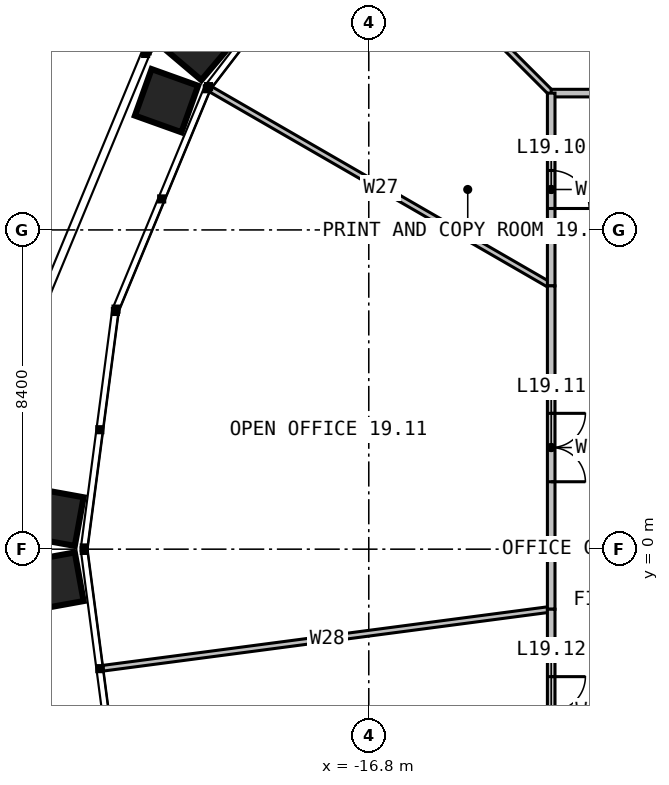
"""IFC4 building model, lengths in metres.
Left out: names, types, materials, properties, quantities, classifications, styles, units other than length and angle.
Written with IfcOpenShell. Run it as: python <this file> out.ifc"""

import sys

from ifc_helpers import new_model, si_unit, direction, frame, frame_2d, origin, place, context, subcontext, project, spatial, rectangle, extrude, element, fill, save


model = new_model("IFC4")
c1 = context("Model", 3, precision=1e-05, world=origin(), true_north=direction((0.0, 1.0)))
c2 = subcontext(c1, "Body", "Model", "MODEL_VIEW")
j1 = project(units=[si_unit("LENGTHUNIT", "METRE"), si_unit("PLANEANGLEUNIT", "RADIAN")], contexts=[c1])
p1 = place(None, origin())
s1 = spatial("IfcSite", under=j1, at=p1, CompositionType="ELEMENT")
p2 = place(p1, origin())
s2 = spatial("IfcBuilding", under=s1, at=p2, CompositionType="ELEMENT")
p3 = place(p2, frame((0.0, 0.0, 81.0)))
s3 = spatial("IfcBuildingStorey", under=s2, at=p3, CompositionType="ELEMENT", Elevation=81.0)
p4 = place(p3, frame((-6.928, 12.0, 0.0), z_axis=(0.0, 0.0, 1.0), x_axis=(-0.500003068493, 0.866023632182, 0.0)))
e1 = element("IfcWall", 1, at=p4, inside=s3, PredefinedType="PARTITIONING", context=c2, shape_type="SweptSolid", body=[
    extrude(rectangle(XDim=10.343, YDim=0.15, at=frame_2d((5.171, 0.0))), origin(), (0.0, 0.0, 1.0), 2.79),
])
p5 = place(p3, frame((-12.0, 12.0, 0.0), z_axis=(0.0, 0.0, 1.0), x_axis=(-0.707106781187, 0.707106781187, 0.0)))
e2 = element("IfcWall", 2, at=p5, inside=s3, PredefinedType="PARTITIONING", context=c2, shape_type="SweptSolid", body=[
    extrude(rectangle(XDim=7.229, YDim=0.15, at=frame_2d((3.614, 0.0))), origin(), (0.0, 0.0, 1.0), 2.79),
])
p6 = place(p3, frame((-12.0, 6.928, 0.0), z_axis=(0.0, 0.0, 1.0), x_axis=(-0.866023632182, 0.500003068493, 0.0)))
e3 = element("IfcWall", 3, at=p6, inside=s3, PredefinedType="PARTITIONING", context=c2, shape_type="SweptSolid", body=[
    extrude(rectangle(XDim=10.343, YDim=0.15, at=frame_2d((5.171, 0.0))), origin(), (0.0, 0.0, 1.0), 2.79),
])
p7 = place(p3, frame((-12.0, -1.58, 0.0), z_axis=(0.0, 0.0, 1.0), x_axis=(-0.991444996724, -0.130525164133, 0.0)))
e4 = element("IfcWall", 4, at=p7, inside=s3, PredefinedType="PARTITIONING", context=c2, shape_type="SweptSolid", body=[
    extrude(rectangle(XDim=11.889, YDim=0.15, at=frame_2d((5.944, 0.0))), origin(), (0.0, 0.0, 1.0), 2.79),
])
p8 = place(p3, frame((-6.928, 12.0, 0.0), z_axis=(0.0, 0.0, 1.0), x_axis=(-1.0, 0.0, 0.0)))
e5 = element("IfcWall", 5, at=p8, inside=s3, PredefinedType="PARTITIONING", context=c2, shape_type="SweptSolid", body=[
    extrude(rectangle(XDim=5.072, YDim=0.2, at=frame_2d((2.536, 0.0))), origin(), (0.0, 0.0, 1.0), 3.8),
])
p9 = place(p8, frame((2.036, 0.0, 0.0)))
e6 = element("IfcOpeningElement", 6, at=p9, cuts=e5, PredefinedType="OPENING", context=c2, shape_type="SweptSolid", body=[
    extrude(rectangle(XDim=1.0, YDim=2.2, at=frame_2d((0.5, 1.1))), frame((0.0, 0.11, 0.0), z_axis=(0.0, -1.0, 0.0), x_axis=(1.0, 0.0, 0.0)), (0.0, 0.0, 1.0), 0.22),
])
p10 = place(p3, frame((-12.0, 12.0, 0.0), z_axis=(0.0, 0.0, 1.0), x_axis=(0.0, -1.0, 0.0)))
e7 = element("IfcWall", 7, at=p10, inside=s3, PredefinedType="PARTITIONING", context=c2, shape_type="SweptSolid", body=[
    extrude(rectangle(XDim=5.072, YDim=0.2, at=frame_2d((2.536, 0.0))), origin(), (0.0, 0.0, 1.0), 3.8),
])
p11 = place(p10, frame((2.036, 0.0, 0.0)))
e8 = element("IfcOpeningElement", 8, at=p11, cuts=e7, PredefinedType="OPENING", context=c2, shape_type="SweptSolid", body=[
    extrude(rectangle(XDim=1.0, YDim=2.2, at=frame_2d((0.5, 1.1))), frame((0.0, 0.11, 0.0), z_axis=(0.0, -1.0, 0.0), x_axis=(1.0, 0.0, 0.0)), (0.0, 0.0, 1.0), 0.22),
])
p12 = place(p3, frame((-12.0, 6.928, 0.0), z_axis=(0.0, 0.0, 1.0), x_axis=(0.0, -1.0, 0.0)))
e9 = element("IfcWall", 9, at=p12, inside=s3, PredefinedType="PARTITIONING", context=c2, shape_type="SweptSolid", body=[
    extrude(rectangle(XDim=8.508, YDim=0.2, at=frame_2d((4.254, 0.0))), origin(), (0.0, 0.0, 1.0), 3.8),
])
p13 = place(p12, frame((3.354, 0.0, 0.0)))
e10 = element("IfcOpeningElement", 10, at=p13, cuts=e9, PredefinedType="OPENING", context=c2, shape_type="SweptSolid", body=[
    extrude(rectangle(XDim=1.8, YDim=2.2, at=frame_2d((0.9, 1.1))), frame((0.0, 0.11, 0.0), z_axis=(0.0, -1.0, 0.0), x_axis=(1.0, 0.0, 0.0)), (0.0, 0.0, 1.0), 0.22),
])
p14 = place(p3, frame((-12.0, -1.58, 0.0), z_axis=(0.0, 0.0, 1.0), x_axis=(0.0, -1.0, 0.0)))
e11 = element("IfcWall", 11, at=p14, inside=s3, PredefinedType="PARTITIONING", context=c2, shape_type="SweptSolid", body=[
    extrude(rectangle(XDim=5.348, YDim=0.2, at=frame_2d((2.674, 0.0))), origin(), (0.0, 0.0, 1.0), 3.8),
])
p15 = place(p14, frame((1.774, 0.0, 0.0)))
e12 = element("IfcOpeningElement", 12, at=p15, cuts=e11, PredefinedType="OPENING", context=c2, shape_type="SweptSolid", body=[
    extrude(rectangle(XDim=1.8, YDim=2.2, at=frame_2d((0.9, 1.1))), frame((0.0, 0.11, 0.0), z_axis=(0.0, -1.0, 0.0), x_axis=(1.0, 0.0, 0.0)), (0.0, 0.0, 1.0), 0.22),
])
p16 = place(p11, origin())
e13 = element("IfcDoor", 13, at=p16, inside=s3, OperationType="SINGLE_SWING_RIGHT", PredefinedType="DOOR", context=c2, shape_type="SweptSolid", body=[
    extrude(rectangle(XDim=1.0, YDim=2.2, at=frame_2d((0.5, 1.1))), frame((0.0, 0.025, 0.0), z_axis=(0.0, -1.0, 0.0), x_axis=(1.0, 0.0, 0.0)), (0.0, 0.0, 1.0), 0.05),
])
fill(e8, e13)
p17 = place(p13, origin())
e14 = element("IfcDoor", 14, at=p17, inside=s3, OperationType="DOUBLE_DOOR_SINGLE_SWING", PredefinedType="DOOR", context=c2, shape_type="SweptSolid", body=[
    extrude(rectangle(XDim=1.8, YDim=2.2, at=frame_2d((0.9, 1.1))), frame((0.0, 0.025, 0.0), z_axis=(0.0, -1.0, 0.0), x_axis=(1.0, 0.0, 0.0)), (0.0, 0.0, 1.0), 0.05),
])
fill(e10, e14)
p18 = place(p15, origin())
e15 = element("IfcDoor", 15, at=p18, inside=s3, OperationType="DOUBLE_DOOR_SINGLE_SWING", PredefinedType="DOOR", context=c2, shape_type="SweptSolid", body=[
    extrude(rectangle(XDim=1.8, YDim=2.2, at=frame_2d((0.9, 1.1))), frame((0.0, 0.025, 0.0), z_axis=(0.0, -1.0, 0.0), x_axis=(1.0, 0.0, 0.0)), (0.0, 0.0, 1.0), 0.05),
])
fill(e12, e15)
save(model, sys.argv[1])
